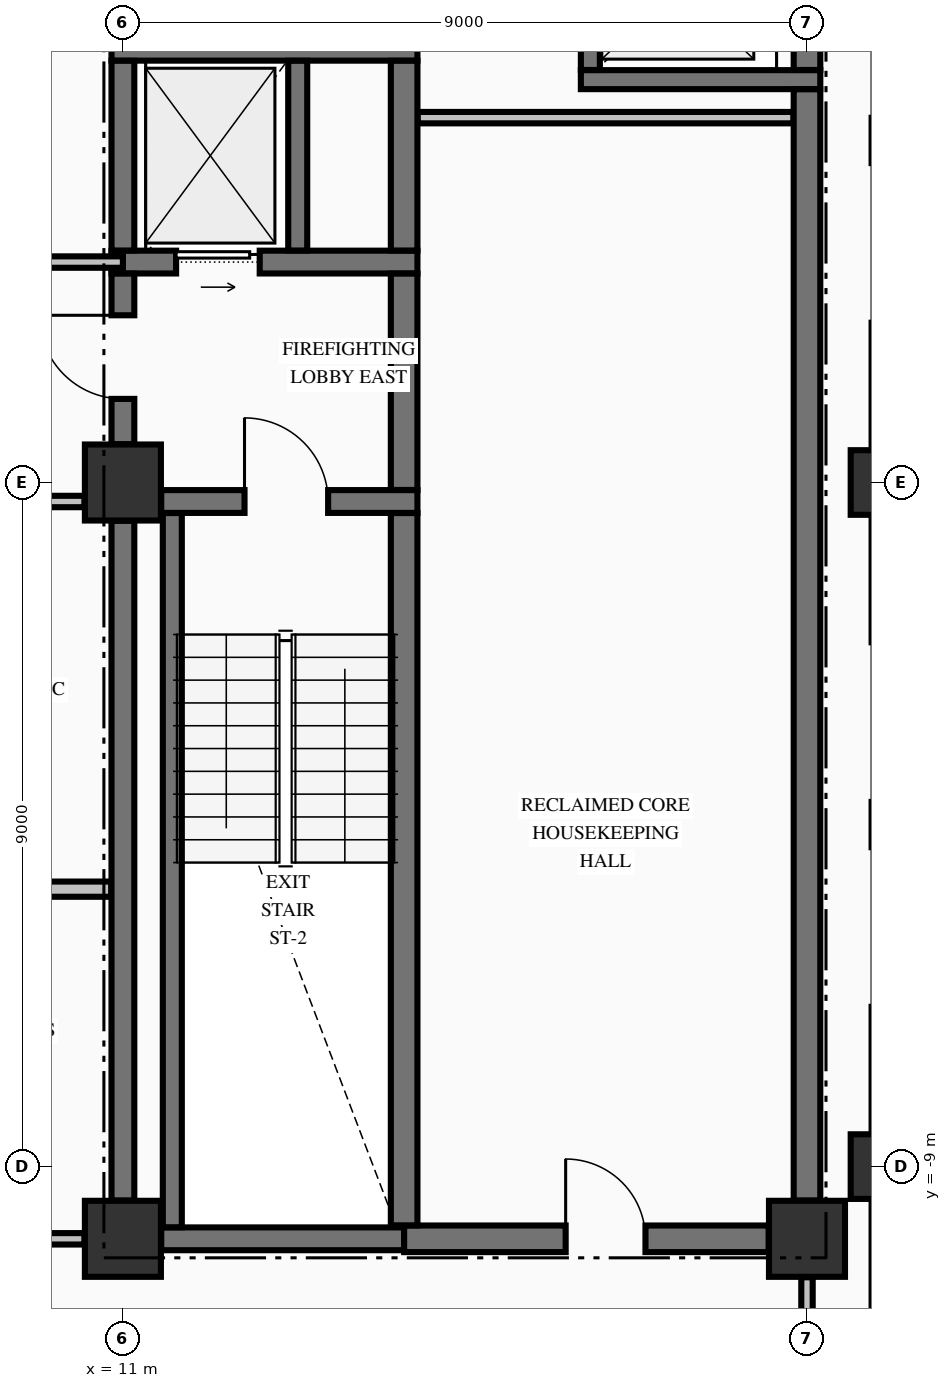
"""IFC4 building model, lengths in metres.
Left out: names, types, materials, properties, quantities, classifications, styles, units other than length and angle.
Written with IfcOpenShell. Run it as: python <this file> out.ifc"""

import sys

from ifc_helpers import new_model, si_unit, direction, frame, frame_2d, origin, origin_2d, place, context, subcontext, project, spatial, rectangle, extrude, element, fill, save


model = new_model("IFC4")
c1 = context("Model", 3, precision=1e-05, world=origin(), true_north=direction((0.0, 1.0)))
c2 = subcontext(c1, "Body", "Model", "MODEL_VIEW")
j1 = project(units=[si_unit("LENGTHUNIT", "METRE"), si_unit("PLANEANGLEUNIT", "RADIAN")], contexts=[c1])
p1 = place(None, origin())
s1 = spatial("IfcSite", under=j1, at=p1, CompositionType="ELEMENT")
p2 = place(p1, origin())
s2 = spatial("IfcBuilding", under=s1, at=p2, CompositionType="ELEMENT")
p3 = place(p2, frame((0.0, 0.0, 278.06)))
s3 = spatial("IfcBuildingStorey", under=s2, at=p3, CompositionType="ELEMENT", Elevation=278.06)
for number, where, z_axis, x_axis in (
    (1, (21.0, -9.0, -0.425), (0.0, 0.0, 1.0), (1.0, 0.0, 0.0)),
    (2, (21.0, 0.0, -0.425), (0.0, 0.0, 1.0), (1.0, 0.0, 0.0)),
):
    element("IfcColumn", number, at=place(p3, frame(where, z_axis=z_axis, x_axis=x_axis)), inside=s3, PredefinedType="COLUMN", context=c2, shape_type="SweptSolid", body=[
        extrude(rectangle(XDim=0.85, YDim=0.85, at=origin_2d()), origin(), (0.0, 0.0, 1.0), 3.84),
    ])
for number, where, z_axis, x_axis in (
    (3, (11.0, -9.95, -0.425), (0.0, 0.0, 1.0), (1.0, 0.0, 0.0)),
    (4, (11.0, 0.0, -0.425), (0.0, 0.0, 1.0), (1.0, 0.0, 0.0)),
    (5, (20.0, -9.95, -0.425), (0.0, 0.0, 1.0), (1.0, 0.0, 0.0)),
):
    element("IfcColumn", number, at=place(p3, frame(where, z_axis=z_axis, x_axis=x_axis)), inside=s3, PredefinedType="COLUMN", context=c2, shape_type="SweptSolid", body=[
        extrude(rectangle(XDim=1.0, YDim=1.0, at=origin_2d()), origin(), (0.0, 0.0, 1.0), 3.84),
    ])
p4 = place(p3, frame((21.0, -17.545, 0.0), z_axis=(0.0, 0.0, 1.0), x_axis=(0.0, 1.0, 0.0)))
e6 = element("IfcWall", 6, at=p4, inside=s3, PredefinedType="STANDARD", context=c2, shape_type="SweptSolid", body=[
    extrude(rectangle(XDim=8.09, YDim=0.3, at=frame_2d((4.045, 0.0))), origin(), (0.0, 0.0, 1.0), 1.607),
])
p5 = place(p3, frame((21.0, -8.545, 0.0), z_axis=(0.0, 0.0, 1.0), x_axis=(0.0, 1.0, 0.0)))
e7 = element("IfcWall", 7, at=p5, inside=s3, PredefinedType="STANDARD", context=c2, shape_type="SweptSolid", body=[
    extrude(rectangle(XDim=8.09, YDim=0.3, at=frame_2d((4.045, 0.0))), origin(), (0.0, 0.0, 1.0), 2.807),
])
p6 = place(p5, frame((1.647, 0.0, 0.7)))
e8 = element("IfcOpeningElement", 8, at=p6, cuts=e7, PredefinedType="OPENING", context=c2, shape_type="SweptSolid", body=[
    extrude(rectangle(XDim=2.1, YDim=1.5, at=frame_2d((1.05, 0.75))), frame((0.0, 0.16, 0.0), z_axis=(0.0, -1.0, 0.0), x_axis=(1.0, 0.0, 0.0)), (0.0, 0.0, 1.0), 0.32),
])
p7 = place(p5, frame((4.343, 0.0, 0.7)))
e9 = element("IfcOpeningElement", 9, at=p7, cuts=e7, PredefinedType="OPENING", context=c2, shape_type="SweptSolid", body=[
    extrude(rectangle(XDim=2.1, YDim=1.5, at=frame_2d((1.05, 0.75))), frame((0.0, 0.16, 0.0), z_axis=(0.0, -1.0, 0.0), x_axis=(1.0, 0.0, 0.0)), (0.0, 0.0, 1.0), 0.32),
])
p8 = place(p3, frame((21.0, 0.455, 0.0), z_axis=(0.0, 0.0, 1.0), x_axis=(0.0, 1.0, 0.0)))
e10 = element("IfcWall", 10, at=p8, inside=s3, PredefinedType="STANDARD", context=c2, shape_type="SweptSolid", body=[
    extrude(rectangle(XDim=8.09, YDim=0.3, at=frame_2d((4.045, 0.0))), origin(), (0.0, 0.0, 1.0), 2.807),
])
p9 = place(p8, frame((1.647, 0.0, 0.7)))
e11 = element("IfcOpeningElement", 11, at=p9, cuts=e10, PredefinedType="OPENING", context=c2, shape_type="SweptSolid", body=[
    extrude(rectangle(XDim=2.1, YDim=1.5, at=frame_2d((1.05, 0.75))), frame((0.0, 0.16, 0.0), z_axis=(0.0, -1.0, 0.0), x_axis=(1.0, 0.0, 0.0)), (0.0, 0.0, 1.0), 0.32),
])
p10 = place(p8, frame((4.343, 0.0, 0.7)))
e12 = element("IfcOpeningElement", 12, at=p10, cuts=e10, PredefinedType="OPENING", context=c2, shape_type="SweptSolid", body=[
    extrude(rectangle(XDim=2.1, YDim=1.5, at=frame_2d((1.05, 0.75))), frame((0.0, 0.16, 0.0), z_axis=(0.0, -1.0, 0.0), x_axis=(1.0, 0.0, 0.0)), (0.0, 0.0, 1.0), 0.32),
])
p11 = place(p3, frame((11.504, -9.95, 0.0), z_axis=(0.0, 0.0, 1.0), x_axis=(1.0, 0.0, 0.0)))
e13 = element("IfcWall", 13, at=p11, inside=s3, PredefinedType="SHEAR", context=c2, shape_type="SweptSolid", body=[
    extrude(rectangle(XDim=3.196, YDim=0.3, at=frame_2d((1.598, 0.0))), origin(), (0.0, 0.0, 1.0), 3.415),
])
p12 = place(p3, frame((14.7, -9.95, 0.0), z_axis=(0.0, 0.0, 1.0), x_axis=(1.0, 0.0, 0.0)))
e14 = element("IfcWall", 14, at=p12, inside=s3, PredefinedType="SHEAR", context=c2, shape_type="SweptSolid", body=[
    extrude(rectangle(XDim=4.796, YDim=0.35, at=frame_2d((2.398, 0.0))), origin(), (0.0, 0.0, 1.0), 3.415),
])
p13 = place(p12, frame((2.125, 0.0, 0.0)))
e15 = element("IfcOpeningElement", 15, at=p13, cuts=e14, PredefinedType="OPENING", context=c2, shape_type="SweptSolid", body=[
    extrude(rectangle(XDim=1.05, YDim=2.15, at=frame_2d((0.525, 1.075))), frame((0.0, 0.185, 0.0), z_axis=(0.0, -1.0, 0.0), x_axis=(1.0, 0.0, 0.0)), (0.0, 0.0, 1.0), 0.37),
])
p14 = place(p3, frame((11.504, -0.25, 0.0), z_axis=(0.0, 0.0, 1.0), x_axis=(1.0, 0.0, 0.0)))
e16 = element("IfcWall", 16, at=p14, inside=s3, PredefinedType="SHEAR", context=c2, shape_type="SweptSolid", body=[
    extrude(rectangle(XDim=3.371, YDim=0.3, at=frame_2d((1.686, 0.0))), origin(), (0.0, 0.0, 1.0), 3.415),
])
p15 = place(p14, frame((1.096, 0.0, 0.0)))
e17 = element("IfcOpeningElement", 17, at=p15, cuts=e16, PredefinedType="OPENING", context=c2, shape_type="SweptSolid", body=[
    extrude(rectangle(XDim=1.1, YDim=2.15, at=frame_2d((0.55, 1.075))), frame((0.0, 0.16, 0.0), z_axis=(0.0, -1.0, 0.0), x_axis=(1.0, 0.0, 0.0)), (0.0, 0.0, 1.0), 0.32),
])
p16 = place(p3, frame((10.85, 2.9, 0.0), z_axis=(0.0, 0.0, 1.0), x_axis=(1.0, 0.0, 0.0)))
e18 = element("IfcWall", 18, at=p16, inside=s3, PredefinedType="SHEAR", context=c2, shape_type="SweptSolid", body=[
    extrude(rectangle(XDim=4.025, YDim=0.3, at=frame_2d((2.012, 0.0))), origin(), (0.0, 0.0, 1.0), 3.415),
])
p17 = place(p16, frame((0.85, 0.0, 0.0)))
e19 = element("IfcOpeningElement", 19, at=p17, cuts=e18, PredefinedType="OPENING", context=c2, shape_type="SweptSolid", body=[
    extrude(rectangle(XDim=1.1, YDim=2.2, at=frame_2d((0.55, 1.1))), frame((0.0, 0.16, 0.0), z_axis=(0.0, -1.0, 0.0), x_axis=(1.0, 0.0, 0.0)), (0.0, 0.0, 1.0), 0.32),
])
p18 = place(p3, frame((17.025, 5.3, 0.0), z_axis=(0.0, 0.0, 1.0), x_axis=(1.0, 0.0, 0.0)))
e20 = element("IfcWall", 20, at=p18, inside=s3, PredefinedType="SOLIDWALL", context=c2, shape_type="SweptSolid", body=[
    extrude(rectangle(XDim=3.15, YDim=0.25, at=frame_2d((1.575, 0.0))), origin(), (0.0, 0.0, 1.0), 3.415),
])
p19 = place(p3, frame((10.85, 5.7, 0.0), z_axis=(0.0, 0.0, 1.0), x_axis=(1.0, 0.0, 0.0)))
e21 = element("IfcWall", 21, at=p19, inside=s3, PredefinedType="SHEAR", context=c2, shape_type="SweptSolid", body=[
    extrude(rectangle(XDim=4.025, YDim=0.3, at=frame_2d((2.012, 0.0))), origin(), (0.0, 0.0, 1.0), 3.415),
])
p20 = place(p3, frame((-10.494, -9.95, 0.0), z_axis=(0.0, 0.0, 1.0), x_axis=(1.0, 0.0, 0.0)))
e22 = element("IfcWall", 22, at=p20, inside=s3, PredefinedType="PARTITIONING", context=c2, shape_type="SweptSolid", body=[
    extrude(rectangle(XDim=20.988, YDim=0.15, at=frame_2d((10.494, 0.0))), origin(), (0.0, 0.0, 1.0), 3.415),
])
p21 = place(p20, frame((6.244, 0.0, 0.0)))
e23 = element("IfcOpeningElement", 23, at=p21, cuts=e22, PredefinedType="OPENING", context=c2, shape_type="SweptSolid", body=[
    extrude(rectangle(XDim=1.1, YDim=2.15, at=frame_2d((0.55, 1.075))), frame((0.0, 0.085, 0.0), z_axis=(0.0, -1.0, 0.0), x_axis=(1.0, 0.0, 0.0)), (0.0, 0.0, 1.0), 0.17),
])
p22 = place(p20, frame((13.619, 0.0, 0.0)))
e24 = element("IfcOpeningElement", 24, at=p22, cuts=e22, PredefinedType="OPENING", context=c2, shape_type="SweptSolid", body=[
    extrude(rectangle(XDim=0.95, YDim=2.15, at=frame_2d((0.475, 1.075))), frame((0.0, 0.085, 0.0), z_axis=(0.0, -1.0, 0.0), x_axis=(1.0, 0.0, 0.0)), (0.0, 0.0, 1.0), 0.17),
])
p23 = place(p20, frame((17.844, 0.0, 0.0)))
e25 = element("IfcOpeningElement", 25, at=p23, cuts=e22, PredefinedType="OPENING", context=c2, shape_type="SweptSolid", body=[
    extrude(rectangle(XDim=0.9, YDim=2.15, at=frame_2d((0.45, 1.075))), frame((0.0, 0.085, 0.0), z_axis=(0.0, -1.0, 0.0), x_axis=(1.0, 0.0, 0.0)), (0.0, 0.0, 1.0), 0.17),
])
p24 = place(p3, frame((-2.675, -5.35, 0.0), z_axis=(0.0, 0.0, 1.0), x_axis=(1.0, 0.0, 0.0)))
e26 = element("IfcWall", 26, at=p24, inside=s3, PredefinedType="PARTITIONING", context=c2, shape_type="SweptSolid", body=[
    extrude(rectangle(XDim=13.522, YDim=0.2, at=frame_2d((6.761, 0.0))), origin(), (0.0, 0.0, 1.0), 3.415),
])
p25 = place(p3, frame((-10.494, -0.25, 0.0), z_axis=(0.0, 0.0, 1.0), x_axis=(1.0, 0.0, 0.0)))
e27 = element("IfcWall", 27, at=p25, inside=s3, PredefinedType="PARTITIONING", context=c2, shape_type="SweptSolid", body=[
    extrude(rectangle(XDim=20.988, YDim=0.15, at=frame_2d((10.494, 0.0))), origin(), (0.0, 0.0, 1.0), 3.415),
])
p26 = place(p25, frame((6.244, 0.0, 0.0)))
e28 = element("IfcOpeningElement", 28, at=p26, cuts=e27, PredefinedType="OPENING", context=c2, shape_type="SweptSolid", body=[
    extrude(rectangle(XDim=1.1, YDim=2.15, at=frame_2d((0.55, 1.075))), frame((0.0, 0.085, 0.0), z_axis=(0.0, -1.0, 0.0), x_axis=(1.0, 0.0, 0.0)), (0.0, 0.0, 1.0), 0.17),
])
p27 = place(p25, frame((2.069, 0.0, 0.0)))
e29 = element("IfcOpeningElement", 29, at=p27, cuts=e27, PredefinedType="OPENING", context=c2, shape_type="SweptSolid", body=[
    extrude(rectangle(XDim=1.05, YDim=2.15, at=frame_2d((0.525, 1.075))), frame((0.0, 0.085, 0.0), z_axis=(0.0, -1.0, 0.0), x_axis=(1.0, 0.0, 0.0)), (0.0, 0.0, 1.0), 0.17),
])
p28 = place(p25, frame((14.219, 0.0, 0.0)))
e30 = element("IfcOpeningElement", 30, at=p28, cuts=e27, PredefinedType="OPENING", context=c2, shape_type="SweptSolid", body=[
    extrude(rectangle(XDim=0.95, YDim=2.15, at=frame_2d((0.475, 1.075))), frame((0.0, 0.085, 0.0), z_axis=(0.0, -1.0, 0.0), x_axis=(1.0, 0.0, 0.0)), (0.0, 0.0, 1.0), 0.17),
])
p29 = place(p3, frame((-11.0, 2.9, 0.0), z_axis=(0.0, 0.0, 1.0), x_axis=(1.0, 0.0, 0.0)))
e31 = element("IfcWall", 31, at=p29, inside=s3, PredefinedType="PARTITIONING", context=c2, shape_type="SweptSolid", body=[
    extrude(rectangle(XDim=22.0, YDim=0.15, at=frame_2d((11.0, 0.0))), origin(), (0.0, 0.0, 1.0), 3.415),
])
p30 = place(p29, frame((6.75, 0.0, 0.0)))
e32 = element("IfcOpeningElement", 32, at=p30, cuts=e31, PredefinedType="OPENING", context=c2, shape_type="SweptSolid", body=[
    extrude(rectangle(XDim=1.1, YDim=2.15, at=frame_2d((0.55, 1.075))), frame((0.0, 0.085, 0.0), z_axis=(0.0, -1.0, 0.0), x_axis=(1.0, 0.0, 0.0)), (0.0, 0.0, 1.0), 0.17),
])
p31 = place(p29, frame((2.575, 0.0, 0.0)))
e33 = element("IfcOpeningElement", 33, at=p31, cuts=e31, PredefinedType="OPENING", context=c2, shape_type="SweptSolid", body=[
    extrude(rectangle(XDim=1.05, YDim=2.15, at=frame_2d((0.525, 1.075))), frame((0.0, 0.085, 0.0), z_axis=(0.0, -1.0, 0.0), x_axis=(1.0, 0.0, 0.0)), (0.0, 0.0, 1.0), 0.17),
])
p32 = place(p29, frame((14.65, 0.0, 0.0)))
e34 = element("IfcOpeningElement", 34, at=p32, cuts=e31, PredefinedType="OPENING", context=c2, shape_type="SweptSolid", body=[
    extrude(rectangle(XDim=1.1, YDim=2.15, at=frame_2d((0.55, 1.075))), frame((0.0, 0.085, 0.0), z_axis=(0.0, -1.0, 0.0), x_axis=(1.0, 0.0, 0.0)), (0.0, 0.0, 1.0), 0.17),
])
p33 = place(p3, frame((14.878, 4.8, 0.0), z_axis=(0.0, 0.0, 1.0), x_axis=(1.0, 0.0, 0.0)))
e35 = element("IfcWall", 35, at=p33, inside=s3, PredefinedType="PARTITIONING", context=c2, shape_type="SweptSolid", body=[
    extrude(rectangle(XDim=4.944, YDim=0.15, at=frame_2d((2.472, 0.0))), origin(), (0.0, 0.0, 1.0), 3.415),
])
p34 = place(p3, frame((11.0, -9.446, 0.0), z_axis=(0.0, 0.0, 1.0), x_axis=(0.0, 1.0, 0.0)))
e36 = element("IfcWall", 36, at=p34, inside=s3, PredefinedType="SHEAR", context=c2, shape_type="SweptSolid", body=[
    extrude(rectangle(XDim=8.942, YDim=0.3, at=frame_2d((4.471, 0.0))), origin(), (0.0, 0.0, 1.0), 3.415),
])
p35 = place(p3, frame((11.0, 0.504, 0.0), z_axis=(0.0, 0.0, 1.0), x_axis=(0.0, 1.0, 0.0)))
e37 = element("IfcWall", 37, at=p35, inside=s3, PredefinedType="SHEAR", context=c2, shape_type="SweptSolid", body=[
    extrude(rectangle(XDim=2.244, YDim=0.3, at=frame_2d((1.122, 0.0))), origin(), (0.0, 0.0, 1.0), 3.415),
])
p36 = place(p35, frame((0.596, 0.0, 0.0)))
e38 = element("IfcOpeningElement", 38, at=p36, cuts=e37, PredefinedType="OPENING", context=c2, shape_type="SweptSolid", body=[
    extrude(rectangle(XDim=1.1, YDim=2.15, at=frame_2d((0.55, 1.075))), frame((0.0, 0.16, 0.0), z_axis=(0.0, -1.0, 0.0), x_axis=(1.0, 0.0, 0.0)), (0.0, 0.0, 1.0), 0.32),
])
p37 = place(p3, frame((11.0, 3.052, 0.0), z_axis=(0.0, 0.0, 1.0), x_axis=(0.0, 1.0, 0.0)))
e39 = element("IfcWall", 39, at=p37, inside=s3, PredefinedType="SHEAR", context=c2, shape_type="SweptSolid", body=[
    extrude(rectangle(XDim=2.496, YDim=0.3, at=frame_2d((1.248, 0.0))), origin(), (0.0, 0.0, 1.0), 3.415),
])
p38 = place(p3, frame((11.65, -9.798, 0.0), z_axis=(0.0, 0.0, 1.0), x_axis=(0.0, 1.0, 0.0)))
e40 = element("IfcWall", 40, at=p38, inside=s3, PredefinedType="SOLIDWALL", context=c2, shape_type="SweptSolid", body=[
    extrude(rectangle(XDim=9.396, YDim=0.25, at=frame_2d((4.698, 0.0))), origin(), (0.0, 0.0, 1.0), 3.415),
])
p39 = place(p3, frame((13.3, 3.052, 0.0), z_axis=(0.0, 0.0, 1.0), x_axis=(0.0, 1.0, 0.0)))
e41 = element("IfcWall", 41, at=p39, inside=s3, PredefinedType="SOLIDWALL", context=c2, shape_type="SweptSolid", body=[
    extrude(rectangle(XDim=2.496, YDim=0.25, at=frame_2d((1.248, 0.0))), origin(), (0.0, 0.0, 1.0), 3.415),
])
p40 = place(p3, frame((14.7, -9.773, 0.0), z_axis=(0.0, 0.0, 1.0), x_axis=(0.0, 1.0, 0.0)))
e42 = element("IfcWall", 42, at=p40, inside=s3, PredefinedType="SHEAR", context=c2, shape_type="SweptSolid", body=[
    extrude(rectangle(XDim=9.371, YDim=0.35, at=frame_2d((4.686, 0.0))), origin(), (0.0, 0.0, 1.0), 3.415),
])
p41 = place(p3, frame((14.7, -0.098, 0.0), z_axis=(0.0, 0.0, 1.0), x_axis=(0.0, 1.0, 0.0)))
e43 = element("IfcWall", 43, at=p41, inside=s3, PredefinedType="SHEAR", context=c2, shape_type="SweptSolid", body=[
    extrude(rectangle(XDim=2.846, YDim=0.35, at=frame_2d((1.423, 0.0))), origin(), (0.0, 0.0, 1.0), 3.415),
])
p42 = place(p3, frame((14.7, 3.052, 0.0), z_axis=(0.0, 0.0, 1.0), x_axis=(0.0, 1.0, 0.0)))
e44 = element("IfcWall", 44, at=p42, inside=s3, PredefinedType="SHEAR", context=c2, shape_type="SweptSolid", body=[
    extrude(rectangle(XDim=2.496, YDim=0.35, at=frame_2d((1.248, 0.0))), origin(), (0.0, 0.0, 1.0), 3.415),
])
p43 = place(p3, frame((17.15, 5.427, 0.0), z_axis=(0.0, 0.0, 1.0), x_axis=(0.0, 1.0, 0.0)))
e45 = element("IfcWall", 45, at=p43, inside=s3, PredefinedType="SOLIDWALL", context=c2, shape_type="SweptSolid", body=[
    extrude(rectangle(XDim=2.196, YDim=0.25, at=frame_2d((1.098, 0.0))), origin(), (0.0, 0.0, 1.0), 3.415),
])
p44 = place(p43, frame((0.548, 0.0, 0.0)))
e46 = element("IfcOpeningElement", 46, at=p44, cuts=e45, PredefinedType="OPENING", context=c2, shape_type="SweptSolid", body=[
    extrude(rectangle(XDim=1.1, YDim=2.2, at=frame_2d((0.55, 1.1))), frame((0.0, 0.135, 0.0), z_axis=(0.0, -1.0, 0.0), x_axis=(1.0, 0.0, 0.0)), (0.0, 0.0, 1.0), 0.27),
])
p45 = place(p3, frame((20.0, -9.446, 0.0), z_axis=(0.0, 0.0, 1.0), x_axis=(0.0, 1.0, 0.0)))
e47 = element("IfcWall", 47, at=p45, inside=s3, PredefinedType="SHEAR", context=c2, shape_type="SweptSolid", body=[
    extrude(rectangle(XDim=14.619, YDim=0.35, at=frame_2d((7.31, 0.0))), origin(), (0.0, 0.0, 1.0), 3.415),
])
p46 = place(p3, frame((20.0, 5.427, 0.0), z_axis=(0.0, 0.0, 1.0), x_axis=(0.0, 1.0, 0.0)))
e48 = element("IfcWall", 48, at=p46, inside=s3, PredefinedType="SHEAR", context=c2, shape_type="SweptSolid", body=[
    extrude(rectangle(XDim=2.196, YDim=0.35, at=frame_2d((1.098, 0.0))), origin(), (0.0, 0.0, 1.0), 3.415),
])
p47 = place(p3, frame((20.0, -13.172, 0.0), z_axis=(0.0, 0.0, 1.0), x_axis=(0.0, 1.0, 0.0)))
e49 = element("IfcWall", 49, at=p47, inside=s3, PredefinedType="PARTITIONING", context=c2, shape_type="SweptSolid", body=[
    extrude(rectangle(XDim=2.716, YDim=0.15, at=frame_2d((1.358, 0.0))), origin(), (0.0, 0.0, 1.0), 3.005),
])
p48 = place(p15, origin())
e50 = element("IfcDoor", 50, at=p48, inside=s3, OperationType="SINGLE_SWING_LEFT", PredefinedType="DOOR", context=c2, shape_type="SweptSolid", body=[
    extrude(rectangle(XDim=1.1, YDim=2.15, at=frame_2d((0.55, 1.075))), frame((0.0, 0.025, 0.0), z_axis=(0.0, -1.0, 0.0), x_axis=(1.0, 0.0, 0.0)), (0.0, 0.0, 1.0), 0.05),
])
fill(e17, e50)
p49 = place(p36, origin())
e51 = element("IfcDoor", 51, at=p49, inside=s3, OperationType="SINGLE_SWING_RIGHT", PredefinedType="DOOR", context=c2, shape_type="SweptSolid", body=[
    extrude(rectangle(XDim=1.1, YDim=2.15, at=frame_2d((0.55, 1.075))), frame((0.0, 0.025, 0.0), z_axis=(0.0, -1.0, 0.0), x_axis=(1.0, 0.0, 0.0)), (0.0, 0.0, 1.0), 0.05),
])
fill(e38, e51)
p50 = place(p17, origin())
e52 = element("IfcDoor", 52, at=p50, inside=s3, OperationType="SLIDING_TO_RIGHT", PredefinedType="DOOR", context=c2, shape_type="SweptSolid", body=[
    extrude(rectangle(XDim=1.1, YDim=2.2, at=frame_2d((0.55, 1.1))), frame((0.0, 0.025, 0.0), z_axis=(0.0, -1.0, 0.0), x_axis=(1.0, 0.0, 0.0)), (0.0, 0.0, 1.0), 0.05),
])
fill(e19, e52)
p51 = place(p13, origin())
e53 = element("IfcDoor", 53, at=p51, inside=s3, OperationType="SINGLE_SWING_LEFT", PredefinedType="DOOR", context=c2, shape_type="SweptSolid", body=[
    extrude(rectangle(XDim=1.05, YDim=2.15, at=frame_2d((0.525, 1.075))), frame((0.0, 0.025, 0.0), z_axis=(0.0, -1.0, 0.0), x_axis=(1.0, 0.0, 0.0)), (0.0, 0.0, 1.0), 0.05),
])
fill(e15, e53)
save(model, sys.argv[1])
